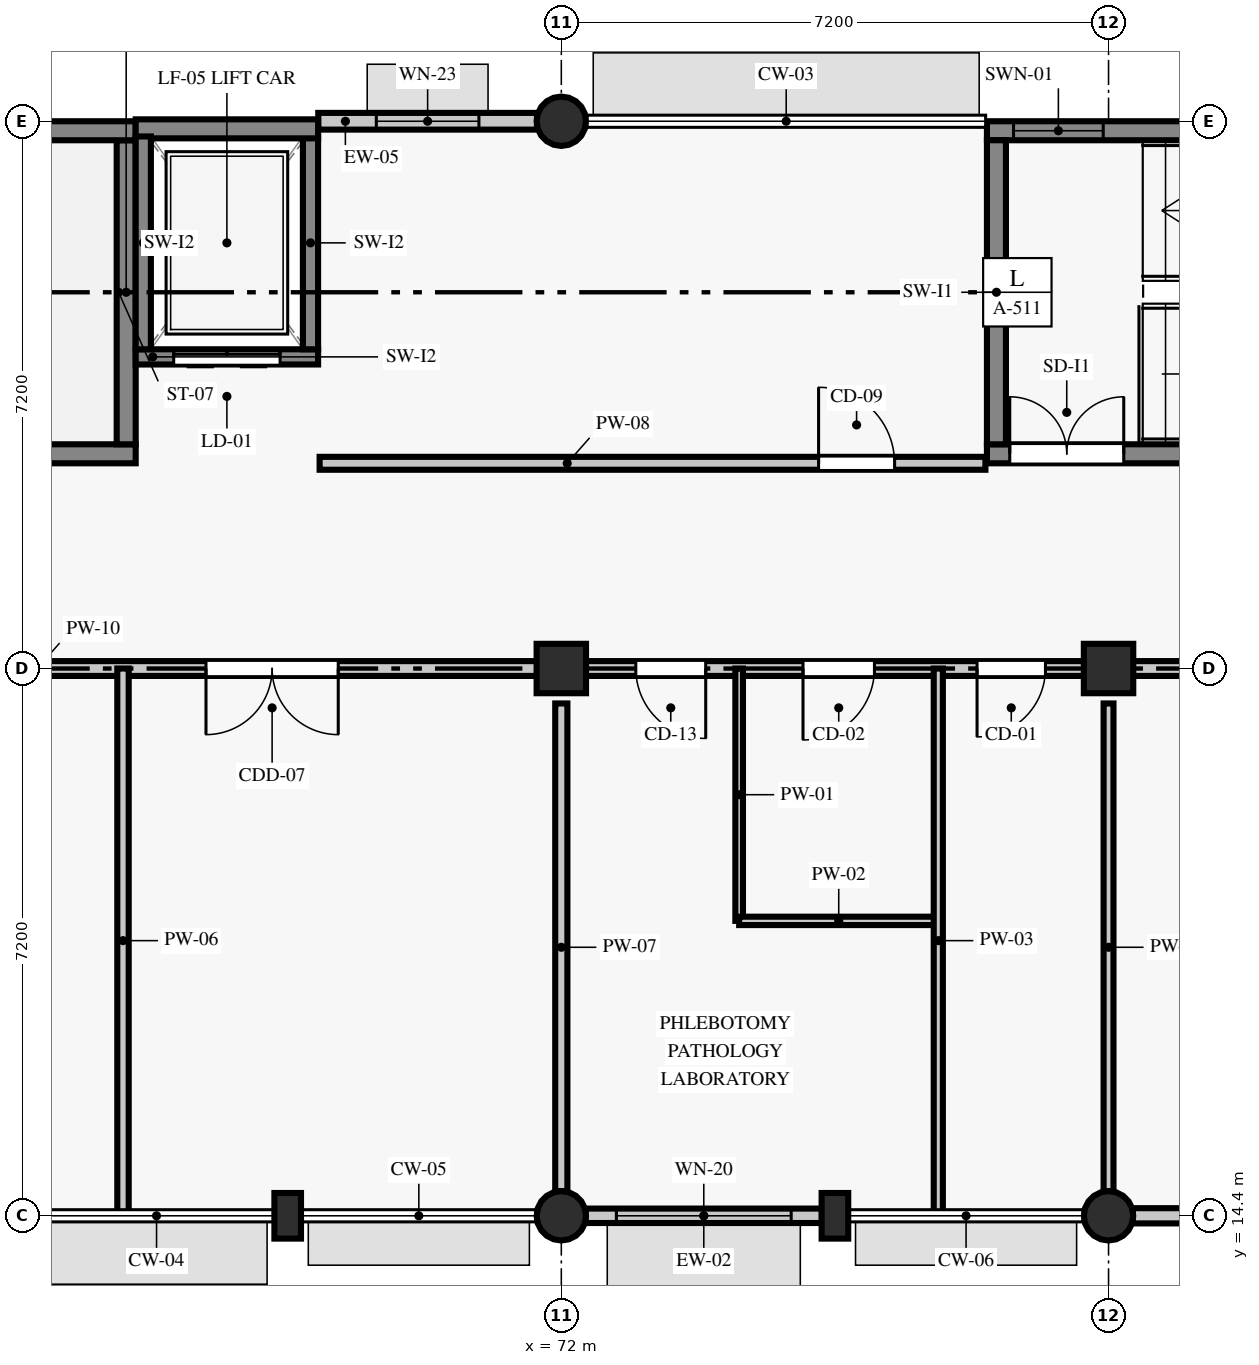
"""IFC4 building model, lengths in metres.
Left out: names, types, materials, properties, quantities, classifications, styles, units other than length and angle.
Written with IfcOpenShell. Run it as: python <this file> out.ifc"""

import sys

from ifc_helpers import new_model, si_unit, direction, frame, frame_2d, origin, origin_2d, place, context, subcontext, project, spatial, rectangle, circle, extrude, element, fill, save


model = new_model("IFC4")
c1 = context("Model", 3, precision=1e-05, world=origin(), true_north=direction((0.0, 1.0)))
c2 = subcontext(c1, "Body", "Model", "MODEL_VIEW")
j1 = project(units=[si_unit("LENGTHUNIT", "METRE"), si_unit("PLANEANGLEUNIT", "RADIAN")], contexts=[c1])
p1 = place(None, origin())
s1 = spatial("IfcSite", under=j1, at=p1, CompositionType="ELEMENT")
p2 = place(p1, origin())
s2 = spatial("IfcBuilding", under=s1, at=p2, CompositionType="ELEMENT")
p3 = place(p2, frame((0.0, 0.0, 4.8)))
s3 = spatial("IfcBuildingStorey", under=s2, at=p3, CompositionType="ELEMENT", Elevation=4.8)
p4 = place(p3, frame((72.0, 14.4, 0.0), z_axis=(0.0, 0.0, 1.0), x_axis=(1.0, 0.0, 0.0)))
e1 = element("IfcColumn", 1, at=p4, inside=s3, PredefinedType="COLUMN", context=c2, shape_type="SweptSolid", body=[
    extrude(circle(Radius=0.325, at=origin_2d()), origin(), (0.0, 0.0, 1.0), 4.505),
])
p5 = place(p3, frame((72.0, 21.6, 0.0), z_axis=(0.0, 0.0, 1.0), x_axis=(1.0, 0.0, 0.0)))
e2 = element("IfcColumn", 2, at=p5, inside=s3, PredefinedType="COLUMN", context=c2, shape_type="SweptSolid", body=[
    extrude(rectangle(XDim=0.65, YDim=0.65, at=origin_2d()), origin(), (0.0, 0.0, 1.0), 4.505),
])
for number, where, z_axis, x_axis in (
    (3, (72.0, 28.8, 0.0), (0.0, 0.0, 1.0), (1.0, 0.0, 0.0)),
    (4, (79.2, 14.4, 0.0), (0.0, 0.0, 1.0), (1.0, 0.0, 0.0)),
):
    element("IfcColumn", number, at=place(p3, frame(where, z_axis=z_axis, x_axis=x_axis)), inside=s3, PredefinedType="COLUMN", context=c2, shape_type="SweptSolid", body=[
        extrude(circle(Radius=0.325, at=origin_2d()), origin(), (0.0, 0.0, 1.0), 4.505),
    ])
p6 = place(p3, frame((79.2, 21.6, 0.0), z_axis=(0.0, 0.0, 1.0), x_axis=(1.0, 0.0, 0.0)))
e5 = element("IfcColumn", 5, at=p6, inside=s3, PredefinedType="COLUMN", context=c2, shape_type="SweptSolid", body=[
    extrude(rectangle(XDim=0.65, YDim=0.65, at=origin_2d()), origin(), (0.0, 0.0, 1.0), 4.505),
])
for number, where, z_axis, x_axis in (
    (6, (68.4, 14.4, 0.0), (0.0, 0.0, 1.0), (1.0, 0.0, 0.0)),
    (7, (75.6, 14.4, 0.0), (0.0, 0.0, 1.0), (1.0, 0.0, 0.0)),
):
    element("IfcColumn", number, at=place(p3, frame(where, z_axis=z_axis, x_axis=x_axis)), inside=s3, PredefinedType="PILASTER", context=c2, shape_type="SweptSolid", body=[
        extrude(rectangle(XDim=0.35, YDim=0.6, at=origin_2d()), origin(), (0.0, 0.0, 1.0), 4.505),
    ])
p7 = place(p3, frame((72.32, 14.4, 0.0), z_axis=(0.0, 0.0, 1.0), x_axis=(1.0, 0.0, 0.0)))
e8 = element("IfcWall", 8, at=p7, inside=s3, PredefinedType="STANDARD", context=c2, shape_type="SweptSolid", body=[
    extrude(rectangle(XDim=3.109, YDim=0.19, at=frame_2d((1.554, 0.0))), origin(), (0.0, 0.0, 1.0), 3.855),
])
p8 = place(p7, frame((0.405, 0.0, 0.9)))
e9 = element("IfcOpeningElement", 9, at=p8, cuts=e8, PredefinedType="OPENING", context=c2, shape_type="SweptSolid", body=[
    extrude(rectangle(XDim=2.3, YDim=1.42, at=frame_2d((1.15, 0.71))), frame((0.0, 0.105, 0.0), z_axis=(0.0, -1.0, 0.0), x_axis=(1.0, 0.0, 0.0)), (0.0, 0.0, 1.0), 0.21),
])
p9 = place(p3, frame((79.52, 14.4, 0.0), z_axis=(0.0, 0.0, 1.0), x_axis=(1.0, 0.0, 0.0)))
e10 = element("IfcWall", 10, at=p9, inside=s3, PredefinedType="STANDARD", context=c2, shape_type="SweptSolid", body=[
    extrude(rectangle(XDim=3.109, YDim=0.2, at=frame_2d((1.554, 0.0))), origin(), (0.0, 0.0, 1.0), 3.855),
])
p10 = place(p9, frame((0.979, 0.0, 0.9)))
e11 = element("IfcOpeningElement", 11, at=p10, cuts=e10, PredefinedType="OPENING", context=c2, shape_type="SweptSolid", body=[
    extrude(rectangle(XDim=1.15, YDim=1.54, at=frame_2d((0.575, 0.77))), frame((0.0, 0.11, 0.0), z_axis=(0.0, -1.0, 0.0), x_axis=(1.0, 0.0, 0.0)), (0.0, 0.0, 1.0), 0.22),
])
p11 = place(p3, frame((71.68, 28.8, 0.0), z_axis=(0.0, 0.0, 1.0), x_axis=(-1.0, 0.0, 0.0)))
e12 = element("IfcWall", 12, at=p11, inside=s3, PredefinedType="STANDARD", context=c2, shape_type="SweptSolid", body=[
    extrude(rectangle(XDim=2.878, YDim=0.22, at=frame_2d((1.439, 0.0))), origin(), (0.0, 0.0, 1.0), 4.505),
])
p12 = place(p11, frame((0.764, 0.0, 0.9)))
e13 = element("IfcOpeningElement", 13, at=p12, cuts=e12, PredefinedType="OPENING", context=c2, shape_type="SweptSolid", body=[
    extrude(rectangle(XDim=1.35, YDim=1.54, at=frame_2d((0.675, 0.77))), frame((0.0, 0.12, 0.0), z_axis=(0.0, -1.0, 0.0), x_axis=(1.0, 0.0, 0.0)), (0.0, 0.0, 1.0), 0.24),
])
p13 = place(p3, frame((57.6, 24.425, 0.0), z_axis=(0.0, 0.0, 1.0), x_axis=(1.0, 0.0, 0.0)))
e14 = element("IfcWall", 14, at=p13, inside=s3, PredefinedType="SHEAR", context=c2, shape_type="SweptSolid", body=[
    extrude(rectangle(XDim=8.8, YDim=0.25, at=frame_2d((4.4, 0.0))), origin(), (0.0, 0.0, 1.0), 4.505),
])
p14 = place(p13, frame((0.3, 0.0, 0.0)))
e15 = element("IfcOpeningElement", 15, at=p14, cuts=e14, PredefinedType="OPENING", context=c2, shape_type="SweptSolid", body=[
    extrude(rectangle(XDim=1.5, YDim=2.15, at=frame_2d((0.75, 1.075))), frame((0.0, 0.135, 0.0), z_axis=(0.0, -1.0, 0.0), x_axis=(1.0, 0.0, 0.0)), (0.0, 0.0, 1.0), 0.27),
])
p15 = place(p3, frame((66.275, 24.55, 0.0), z_axis=(0.0, 0.0, 1.0), x_axis=(0.0, 1.0, 0.0)))
e16 = element("IfcWall", 16, at=p15, inside=s3, PredefinedType="SHEAR", context=c2, shape_type="SweptSolid", body=[
    extrude(rectangle(XDim=4.0, YDim=0.25, at=frame_2d((2.0, 0.0))), origin(), (0.0, 0.0, 1.0), 4.505),
])
p16 = place(p3, frame((66.4, 28.675, 0.0), z_axis=(0.0, 0.0, 1.0), x_axis=(-1.0, 0.0, 0.0)))
e17 = element("IfcWall", 17, at=p16, inside=s3, PredefinedType="SHEAR", context=c2, shape_type="SweptSolid", body=[
    extrude(rectangle(XDim=8.8, YDim=0.25, at=frame_2d((4.4, 0.0))), origin(), (0.0, 0.0, 1.0), 4.505),
])
p17 = place(p16, frame((7.27, 0.0, 0.92)))
e18 = element("IfcOpeningElement", 18, at=p17, cuts=e17, PredefinedType="OPENING", context=c2, shape_type="SweptSolid", body=[
    extrude(rectangle(XDim=1.18, YDim=1.48, at=frame_2d((0.59, 0.74))), frame((0.0, 0.135, 0.0), z_axis=(0.0, -1.0, 0.0), x_axis=(1.0, 0.0, 0.0)), (0.0, 0.0, 1.0), 0.27),
])
p18 = place(p3, frame((77.6, 24.425, 0.0), z_axis=(0.0, 0.0, 1.0), x_axis=(1.0, 0.0, 0.0)))
e19 = element("IfcWall", 19, at=p18, inside=s3, PredefinedType="SHEAR", context=c2, shape_type="SweptSolid", body=[
    extrude(rectangle(XDim=8.8, YDim=0.25, at=frame_2d((4.4, 0.0))), origin(), (0.0, 0.0, 1.0), 4.505),
])
p19 = place(p18, frame((0.3, 0.0, 0.0)))
e20 = element("IfcOpeningElement", 20, at=p19, cuts=e19, PredefinedType="OPENING", context=c2, shape_type="SweptSolid", body=[
    extrude(rectangle(XDim=1.5, YDim=2.15, at=frame_2d((0.75, 1.075))), frame((0.0, 0.135, 0.0), z_axis=(0.0, -1.0, 0.0), x_axis=(1.0, 0.0, 0.0)), (0.0, 0.0, 1.0), 0.27),
])
p20 = place(p3, frame((86.4, 28.675, 0.0), z_axis=(0.0, 0.0, 1.0), x_axis=(-1.0, 0.0, 0.0)))
e21 = element("IfcWall", 21, at=p20, inside=s3, PredefinedType="SHEAR", context=c2, shape_type="SweptSolid", body=[
    extrude(rectangle(XDim=8.8, YDim=0.25, at=frame_2d((4.4, 0.0))), origin(), (0.0, 0.0, 1.0), 4.505),
])
p21 = place(p20, frame((7.27, 0.0, 0.92)))
e22 = element("IfcOpeningElement", 22, at=p21, cuts=e21, PredefinedType="OPENING", context=c2, shape_type="SweptSolid", body=[
    extrude(rectangle(XDim=1.18, YDim=1.48, at=frame_2d((0.59, 0.74))), frame((0.0, 0.135, 0.0), z_axis=(0.0, -1.0, 0.0), x_axis=(1.0, 0.0, 0.0)), (0.0, 0.0, 1.0), 0.27),
])
p22 = place(p3, frame((77.725, 28.55, 0.0), z_axis=(0.0, 0.0, 1.0), x_axis=(0.0, -1.0, 0.0)))
e23 = element("IfcWall", 23, at=p22, inside=s3, PredefinedType="SHEAR", context=c2, shape_type="SweptSolid", body=[
    extrude(rectangle(XDim=4.0, YDim=0.25, at=frame_2d((2.0, 0.0))), origin(), (0.0, 0.0, 1.0), 4.505),
])
p23 = place(p3, frame((66.4, 25.7, 0.0), z_axis=(0.0, 0.0, 1.0), x_axis=(1.0, 0.0, 0.0)))
e24 = element("IfcWall", 24, at=p23, inside=s3, PredefinedType="SHEAR", context=c2, shape_type="SweptSolid", body=[
    extrude(rectangle(XDim=2.4, YDim=0.2, at=frame_2d((1.2, 0.0))), origin(), (0.0, 0.0, 1.0), 4.505),
])
p24 = place(p23, frame((0.5, 0.0, 0.0)))
e25 = element("IfcOpeningElement", 25, at=p24, cuts=e24, PredefinedType="OPENING", context=c2, shape_type="SweptSolid", body=[
    extrude(rectangle(XDim=1.4, YDim=2.15, at=frame_2d((0.7, 1.075))), frame((0.0, 0.11, 0.0), z_axis=(0.0, -1.0, 0.0), x_axis=(1.0, 0.0, 0.0)), (0.0, 0.0, 1.0), 0.22),
])
p25 = place(p3, frame((68.7, 25.8, 0.0), z_axis=(0.0, 0.0, 1.0), x_axis=(0.0, 1.0, 0.0)))
e26 = element("IfcWall", 26, at=p25, inside=s3, PredefinedType="SHEAR", context=c2, shape_type="SweptSolid", body=[
    extrude(rectangle(XDim=2.8, YDim=0.2, at=frame_2d((1.4, 0.0))), origin(), (0.0, 0.0, 1.0), 4.505),
])
p26 = place(p3, frame((68.8, 28.7, 0.0), z_axis=(0.0, 0.0, 1.0), x_axis=(-1.0, 0.0, 0.0)))
e27 = element("IfcWall", 27, at=p26, inside=s3, PredefinedType="SHEAR", context=c2, shape_type="SweptSolid", body=[
    extrude(rectangle(XDim=2.4, YDim=0.25, at=frame_2d((1.2, 0.0))), origin(), (0.0, 0.0, 1.0), 4.505),
])
p27 = place(p3, frame((66.5, 28.6, 0.0), z_axis=(0.0, 0.0, 1.0), x_axis=(0.0, -1.0, 0.0)))
e28 = element("IfcWall", 28, at=p27, inside=s3, PredefinedType="SHEAR", context=c2, shape_type="SweptSolid", body=[
    extrude(rectangle(XDim=2.8, YDim=0.2, at=frame_2d((1.4, 0.0))), origin(), (0.0, 0.0, 1.0), 4.505),
])
p28 = place(p3, frame((50.725, 21.6, 0.0), z_axis=(0.0, 0.0, 1.0), x_axis=(1.0, 0.0, 0.0)))
e29 = element("IfcWall", 29, at=p28, inside=s3, PredefinedType="PARTITIONING", context=c2, shape_type="SweptSolid", body=[
    extrude(rectangle(XDim=35.35, YDim=0.195, at=frame_2d((17.675, 0.0))), origin(), (0.0, 0.0, 1.0), 3.655),
])
p29 = place(p28, frame((2.752, 0.0, 0.0)))
e30 = element("IfcOpeningElement", 30, at=p29, cuts=e29, PredefinedType="OPENING", context=c2, shape_type="SweptSolid", body=[
    extrude(rectangle(XDim=1.54, YDim=2.2, at=frame_2d((0.77, 1.1))), frame((0.0, 0.107, 0.0), z_axis=(0.0, -1.0, 0.0), x_axis=(1.0, 0.0, 0.0)), (0.0, 0.0, 1.0), 0.215),
])
p30 = place(p28, frame((8.569, 0.0, 0.0)))
e31 = element("IfcOpeningElement", 31, at=p30, cuts=e29, PredefinedType="OPENING", context=c2, shape_type="SweptSolid", body=[
    extrude(rectangle(XDim=1.62, YDim=2.22, at=frame_2d((0.81, 1.11))), frame((0.0, 0.107, 0.0), z_axis=(0.0, -1.0, 0.0), x_axis=(1.0, 0.0, 0.0)), (0.0, 0.0, 1.0), 0.215),
])
p31 = place(p28, frame((11.259, 0.0, 0.0)))
e32 = element("IfcOpeningElement", 32, at=p31, cuts=e29, PredefinedType="OPENING", context=c2, shape_type="SweptSolid", body=[
    extrude(rectangle(XDim=0.9, YDim=2.08, at=frame_2d((0.45, 1.04))), frame((0.0, 0.107, 0.0), z_axis=(0.0, -1.0, 0.0), x_axis=(1.0, 0.0, 0.0)), (0.0, 0.0, 1.0), 0.215),
])
p32 = place(p28, frame((16.6, 0.0, 0.0)))
e33 = element("IfcOpeningElement", 33, at=p32, cuts=e29, PredefinedType="OPENING", context=c2, shape_type="SweptSolid", body=[
    extrude(rectangle(XDim=1.74, YDim=2.26, at=frame_2d((0.87, 1.13))), frame((0.0, 0.107, 0.0), z_axis=(0.0, -1.0, 0.0), x_axis=(1.0, 0.0, 0.0)), (0.0, 0.0, 1.0), 0.215),
])
p33 = place(p28, frame((22.255, 0.0, 0.0)))
e34 = element("IfcOpeningElement", 34, at=p33, cuts=e29, PredefinedType="OPENING", context=c2, shape_type="SweptSolid", body=[
    extrude(rectangle(XDim=0.92, YDim=2.18, at=frame_2d((0.46, 1.09))), frame((0.0, 0.107, 0.0), z_axis=(0.0, -1.0, 0.0), x_axis=(1.0, 0.0, 0.0)), (0.0, 0.0, 1.0), 0.215),
])
p34 = place(p28, frame((24.455, 0.0, 0.0)))
e35 = element("IfcOpeningElement", 35, at=p34, cuts=e29, PredefinedType="OPENING", context=c2, shape_type="SweptSolid", body=[
    extrude(rectangle(XDim=0.94, YDim=2.08, at=frame_2d((0.47, 1.04))), frame((0.0, 0.107, 0.0), z_axis=(0.0, -1.0, 0.0), x_axis=(1.0, 0.0, 0.0)), (0.0, 0.0, 1.0), 0.215),
])
p35 = place(p28, frame((26.745, 0.0, 0.0)))
e36 = element("IfcOpeningElement", 36, at=p35, cuts=e29, PredefinedType="OPENING", context=c2, shape_type="SweptSolid", body=[
    extrude(rectangle(XDim=0.9, YDim=2.08, at=frame_2d((0.45, 1.04))), frame((0.0, 0.107, 0.0), z_axis=(0.0, -1.0, 0.0), x_axis=(1.0, 0.0, 0.0)), (0.0, 0.0, 1.0), 0.215),
])
p36 = place(p28, frame((31.123, 0.0, 0.0)))
e37 = element("IfcOpeningElement", 37, at=p36, cuts=e29, PredefinedType="OPENING", context=c2, shape_type="SweptSolid", body=[
    extrude(rectangle(XDim=1.82, YDim=2.26, at=frame_2d((0.91, 1.13))), frame((0.0, 0.107, 0.0), z_axis=(0.0, -1.0, 0.0), x_axis=(1.0, 0.0, 0.0)), (0.0, 0.0, 1.0), 0.215),
])
p37 = place(p3, frame((66.233, 14.44, 0.0), z_axis=(0.0, 0.0, 1.0), x_axis=(0.0, 1.0, 0.0)))
e38 = element("IfcWall", 38, at=p37, inside=s3, PredefinedType="PARTITIONING", context=c2, shape_type="SweptSolid", body=[
    extrude(rectangle(XDim=7.16, YDim=0.15, at=frame_2d((3.58, 0.0))), origin(), (0.0, 0.0, 1.0), 3.655),
])
p38 = place(p3, frame((72.0, 14.725, 0.0), z_axis=(0.0, 0.0, 1.0), x_axis=(0.0, 1.0, 0.0)))
e39 = element("IfcWall", 39, at=p38, inside=s3, PredefinedType="PARTITIONING", context=c2, shape_type="SweptSolid", body=[
    extrude(rectangle(XDim=6.415, YDim=0.16, at=frame_2d((3.208, 0.0))), origin(), (0.0, 0.0, 1.0), 3.905),
])
p39 = place(p3, frame((74.34, 18.28, 0.0), z_axis=(0.0, 0.0, 1.0), x_axis=(0.0, 1.0, 0.0)))
e40 = element("IfcWall", 40, at=p39, inside=s3, PredefinedType="PARTITIONING", context=c2, shape_type="SweptSolid", body=[
    extrude(rectangle(XDim=3.32, YDim=0.1, at=frame_2d((1.66, 0.0))), origin(), (0.0, 0.0, 1.0), 3.655),
])
p40 = place(p3, frame((74.34, 18.28, 0.0), z_axis=(0.0, 0.0, 1.0), x_axis=(1.0, 0.0, 0.0)))
e41 = element("IfcWall", 41, at=p40, inside=s3, PredefinedType="PARTITIONING", context=c2, shape_type="SweptSolid", body=[
    extrude(rectangle(XDim=2.62, YDim=0.11, at=frame_2d((1.31, 0.0))), origin(), (0.0, 0.0, 1.0), 4.505),
])
p41 = place(p3, frame((76.96, 14.44, 0.0), z_axis=(0.0, 0.0, 1.0), x_axis=(0.0, 1.0, 0.0)))
e42 = element("IfcWall", 42, at=p41, inside=s3, PredefinedType="PARTITIONING", context=c2, shape_type="SweptSolid", body=[
    extrude(rectangle(XDim=7.16, YDim=0.12, at=frame_2d((3.58, 0.0))), origin(), (0.0, 0.0, 1.0), 3.655),
])
p42 = place(p3, frame((79.2, 14.725, 0.0), z_axis=(0.0, 0.0, 1.0), x_axis=(0.0, 1.0, 0.0)))
e43 = element("IfcWall", 43, at=p42, inside=s3, PredefinedType="PARTITIONING", context=c2, shape_type="SweptSolid", body=[
    extrude(rectangle(XDim=6.415, YDim=0.13, at=frame_2d((3.208, 0.0))), origin(), (0.0, 0.0, 1.0), 3.905),
])
p43 = place(p3, frame((68.82, 24.3, 0.0), z_axis=(0.0, 0.0, 1.0), x_axis=(1.0, 0.0, 0.0)))
e44 = element("IfcWall", 44, at=p43, inside=s3, PredefinedType="PARTITIONING", context=c2, shape_type="SweptSolid", body=[
    extrude(rectangle(XDim=8.76, YDim=0.17, at=frame_2d((4.38, 0.0))), origin(), (0.0, 0.0, 1.0), 3.905),
])
p44 = place(p43, frame((6.565, 0.0, 0.0)))
e45 = element("IfcOpeningElement", 45, at=p44, cuts=e44, PredefinedType="OPENING", context=c2, shape_type="SweptSolid", body=[
    extrude(rectangle(XDim=1.0, YDim=2.13, at=frame_2d((0.5, 1.065))), frame((0.0, 0.095, 0.0), z_axis=(0.0, -1.0, 0.0), x_axis=(1.0, 0.0, 0.0)), (0.0, 0.0, 1.0), 0.19),
])
p45 = place(p8, origin())
e46 = element("IfcWindow", 46, at=p45, inside=s3, PartitioningType="SINGLE_PANEL", PredefinedType="WINDOW", context=c2, shape_type="SweptSolid", body=[
    extrude(rectangle(XDim=2.3, YDim=1.42, at=frame_2d((1.15, 0.71))), frame((0.0, 0.03, 0.0), z_axis=(0.0, -1.0, 0.0), x_axis=(1.0, 0.0, 0.0)), (0.0, 0.0, 1.0), 0.06),
])
fill(e9, e46)
p46 = place(p12, origin())
e47 = element("IfcWindow", 47, at=p46, inside=s3, PartitioningType="SINGLE_PANEL", PredefinedType="WINDOW", context=c2, shape_type="SweptSolid", body=[
    extrude(rectangle(XDim=1.35, YDim=1.54, at=frame_2d((0.675, 0.77))), frame((0.0, 0.03, 0.0), z_axis=(0.0, -1.0, 0.0), x_axis=(1.0, 0.0, 0.0)), (0.0, 0.0, 1.0), 0.06),
])
fill(e13, e47)
p47 = place(p19, origin())
e48 = element("IfcDoor", 48, at=p47, inside=s3, OperationType="DOUBLE_DOOR_SINGLE_SWING", PredefinedType="DOOR", context=c2, shape_type="SweptSolid", body=[
    extrude(rectangle(XDim=1.5, YDim=2.15, at=frame_2d((0.75, 1.075))), frame((0.0, 0.025, 0.0), z_axis=(0.0, -1.0, 0.0), x_axis=(1.0, 0.0, 0.0)), (0.0, 0.0, 1.0), 0.05),
])
fill(e20, e48)
p48 = place(p21, origin())
e49 = element("IfcWindow", 49, at=p48, inside=s3, PartitioningType="SINGLE_PANEL", PredefinedType="WINDOW", context=c2, shape_type="SweptSolid", body=[
    extrude(rectangle(XDim=1.18, YDim=1.48, at=frame_2d((0.59, 0.74))), frame((0.0, 0.03, 0.0), z_axis=(0.0, -1.0, 0.0), x_axis=(1.0, 0.0, 0.0)), (0.0, 0.0, 1.0), 0.06),
])
fill(e22, e49)
p49 = place(p24, frame((1.4, 0.0, 0.0), z_axis=(0.0, 0.0, 1.0), x_axis=(-1.0, 0.0, 0.0)))
e50 = element("IfcDoor", 50, at=p49, inside=s3, OperationType="DOUBLE_DOOR_SLIDING", PredefinedType="DOOR", context=c2, shape_type="SweptSolid", body=[
    extrude(rectangle(XDim=1.4, YDim=2.15, at=frame_2d((0.7, 1.075))), frame((0.0, 0.025, 0.0), z_axis=(0.0, -1.0, 0.0), x_axis=(1.0, 0.0, 0.0)), (0.0, 0.0, 1.0), 0.05),
])
fill(e25, e50)
p50 = place(p32, frame((1.74, 0.0, 0.0), z_axis=(0.0, 0.0, 1.0), x_axis=(-1.0, 0.0, 0.0)))
e51 = element("IfcDoor", 51, at=p50, inside=s3, OperationType="DOUBLE_DOOR_SINGLE_SWING", PredefinedType="DOOR", context=c2, shape_type="SweptSolid", body=[
    extrude(rectangle(XDim=1.74, YDim=2.26, at=frame_2d((0.87, 1.13))), frame((0.0, 0.025, 0.0), z_axis=(0.0, -1.0, 0.0), x_axis=(1.0, 0.0, 0.0)), (0.0, 0.0, 1.0), 0.05),
])
fill(e33, e51)
p51 = place(p33, frame((0.92, 0.0, 0.0), z_axis=(0.0, 0.0, 1.0), x_axis=(-1.0, 0.0, 0.0)))
e52 = element("IfcDoor", 52, at=p51, inside=s3, OperationType="SINGLE_SWING_LEFT", PredefinedType="DOOR", context=c2, shape_type="SweptSolid", body=[
    extrude(rectangle(XDim=0.92, YDim=2.18, at=frame_2d((0.46, 1.09))), frame((0.0, 0.025, 0.0), z_axis=(0.0, -1.0, 0.0), x_axis=(1.0, 0.0, 0.0)), (0.0, 0.0, 1.0), 0.05),
])
fill(e34, e52)
p52 = place(p34, frame((0.94, 0.0, 0.0), z_axis=(0.0, 0.0, 1.0), x_axis=(-1.0, 0.0, 0.0)))
e53 = element("IfcDoor", 53, at=p52, inside=s3, OperationType="SINGLE_SWING_RIGHT", PredefinedType="DOOR", context=c2, shape_type="SweptSolid", body=[
    extrude(rectangle(XDim=0.94, YDim=2.08, at=frame_2d((0.47, 1.04))), frame((0.0, 0.025, 0.0), z_axis=(0.0, -1.0, 0.0), x_axis=(1.0, 0.0, 0.0)), (0.0, 0.0, 1.0), 0.05),
])
fill(e35, e53)
p53 = place(p35, frame((0.9, 0.0, 0.0), z_axis=(0.0, 0.0, 1.0), x_axis=(-1.0, 0.0, 0.0)))
e54 = element("IfcDoor", 54, at=p53, inside=s3, OperationType="SINGLE_SWING_RIGHT", PredefinedType="DOOR", context=c2, shape_type="SweptSolid", body=[
    extrude(rectangle(XDim=0.9, YDim=2.08, at=frame_2d((0.45, 1.04))), frame((0.0, 0.025, 0.0), z_axis=(0.0, -1.0, 0.0), x_axis=(1.0, 0.0, 0.0)), (0.0, 0.0, 1.0), 0.05),
])
fill(e36, e54)
p54 = place(p44, origin())
e55 = element("IfcDoor", 55, at=p54, inside=s3, OperationType="SINGLE_SWING_LEFT", PredefinedType="DOOR", context=c2, shape_type="SweptSolid", body=[
    extrude(rectangle(XDim=1.0, YDim=2.13, at=frame_2d((0.5, 1.065))), frame((0.0, 0.025, 0.0), z_axis=(0.0, -1.0, 0.0), x_axis=(1.0, 0.0, 0.0)), (0.0, 0.0, 1.0), 0.05),
])
fill(e45, e55)
save(model, sys.argv[1])
